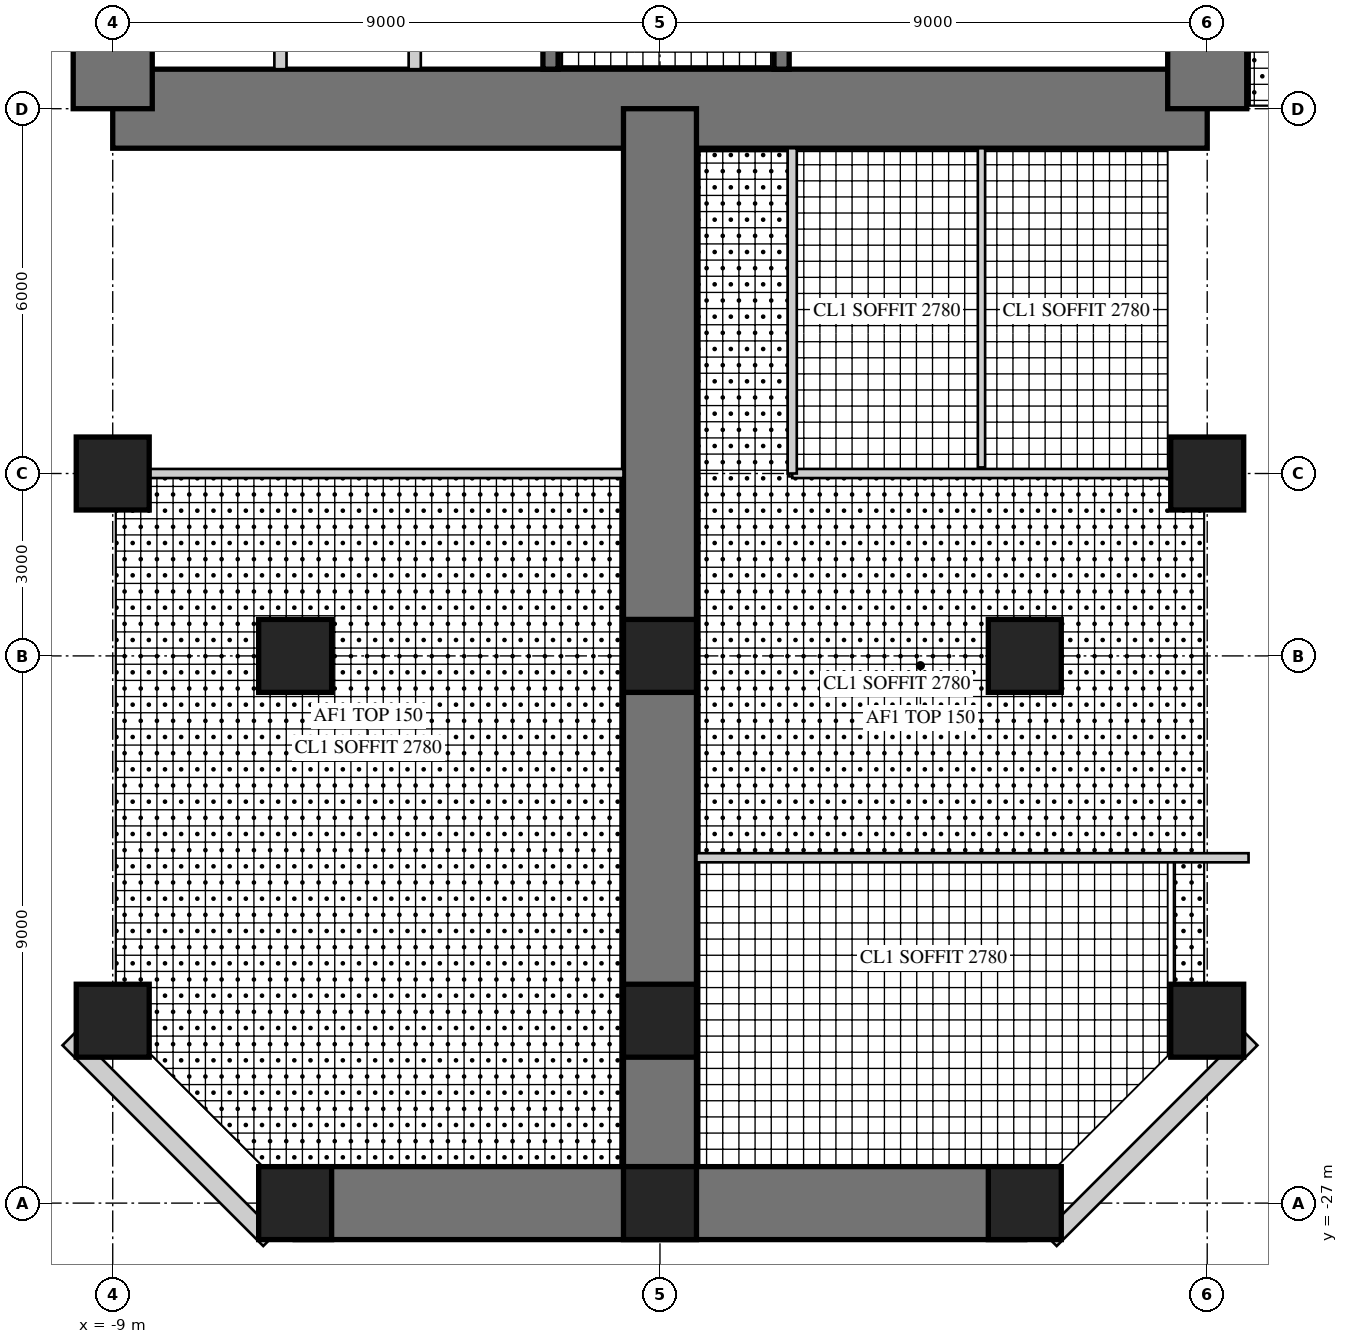
"""IFC4 building model, lengths in metres.
Left out: names, types, materials, properties, quantities, classifications, styles, units other than length and angle.
Written with IfcOpenShell. Run it as: python <this file> out.ifc"""

import sys

from ifc_helpers import new_model, si_unit, direction, frame, frame_2d, origin, origin_2d, place, context, subcontext, project, spatial, rectangle, hollow_rectangle, extrude, element, fill, save


model = new_model("IFC4")
c1 = context("Model", 3, precision=1e-05, world=origin(), true_north=direction((0.0, 1.0)))
c2 = subcontext(c1, "Body", "Model", "MODEL_VIEW")
j1 = project(units=[si_unit("LENGTHUNIT", "METRE"), si_unit("PLANEANGLEUNIT", "RADIAN")], contexts=[c1])
p1 = place(None, origin())
s1 = spatial("IfcSite", under=j1, at=p1, CompositionType="ELEMENT")
p2 = place(p1, origin())
s2 = spatial("IfcBuilding", under=s1, at=p2, CompositionType="ELEMENT")
p3 = place(p2, frame((0.0, 0.0, 71.5)))
s3 = spatial("IfcBuildingStorey", under=s2, at=p3, CompositionType="ELEMENT", Elevation=71.5)
p4 = place(p3, frame((-9.0, -9.0, 0.0), z_axis=(0.0, 0.0, 1.0), x_axis=(1.0, 0.0, 0.0)))
e1 = element("IfcWall", 1, at=p4, inside=s3, PredefinedType="SHEAR", context=c2, shape_type="SweptSolid", body=[
    extrude(rectangle(XDim=18.0, YDim=1.3, at=frame_2d((9.0, 0.0))), origin(), (0.0, 0.0, 1.0), 4.0),
])
p5 = place(p4, frame((9.8, 0.0, 0.0)))
e2 = element("IfcOpeningElement", 2, at=p5, cuts=e1, PredefinedType="OPENING", context=c2, shape_type="SweptSolid", body=[
    extrude(rectangle(XDim=1.0, YDim=2.4, at=frame_2d((0.5, 1.2))), frame((0.0, 0.66, 0.0), z_axis=(0.0, -1.0, 0.0), x_axis=(1.0, 0.0, 0.0)), (0.0, 0.0, 1.0), 1.32),
])
p6 = place(p3, frame((9.0, -9.0, 0.0), z_axis=(0.0, 0.0, 1.0), x_axis=(0.0, 1.0, 0.0)))
e3 = element("IfcWall", 3, at=p6, inside=s3, PredefinedType="SHEAR", context=c2, shape_type="SweptSolid", body=[
    extrude(rectangle(XDim=18.0, YDim=1.3, at=frame_2d((9.0, 0.0))), origin(), (0.0, 0.0, 1.0), 4.0),
])
p7 = place(p6, frame((9.8, 0.0, 0.0)))
e4 = element("IfcOpeningElement", 4, at=p7, cuts=e3, PredefinedType="OPENING", context=c2, shape_type="SweptSolid", body=[
    extrude(rectangle(XDim=1.0, YDim=2.4, at=frame_2d((0.5, 1.2))), frame((0.0, 0.66, 0.0), z_axis=(0.0, -1.0, 0.0), x_axis=(1.0, 0.0, 0.0)), (0.0, 0.0, 1.0), 1.32),
])
p8 = place(p3, frame((-9.0, 9.0, 0.0), z_axis=(0.0, 0.0, 1.0), x_axis=(0.0, -1.0, 0.0)))
e5 = element("IfcWall", 5, at=p8, inside=s3, PredefinedType="SHEAR", context=c2, shape_type="SweptSolid", body=[
    extrude(rectangle(XDim=18.0, YDim=1.3, at=frame_2d((9.0, 0.0))), origin(), (0.0, 0.0, 1.0), 4.0),
])
p9 = place(p8, frame((9.8, 0.0, 0.0)))
e6 = element("IfcOpeningElement", 6, at=p9, cuts=e5, PredefinedType="OPENING", context=c2, shape_type="SweptSolid", body=[
    extrude(rectangle(XDim=1.0, YDim=2.4, at=frame_2d((0.5, 1.2))), frame((0.0, 0.66, 0.0), z_axis=(0.0, -1.0, 0.0), x_axis=(1.0, 0.0, 0.0)), (0.0, 0.0, 1.0), 1.32),
])
p10 = place(p3, frame((-1.8, -1.875, 0.0), z_axis=(0.0, 0.0, 1.0), x_axis=(0.0, -1.0, 0.0)))
e7 = element("IfcWall", 7, at=p10, inside=s3, PredefinedType="SHEAR", context=c2, shape_type="SweptSolid", body=[
    extrude(rectangle(XDim=6.475, YDim=0.25, at=frame_2d((3.238, 0.0))), origin(), (0.0, 0.0, 1.0), 4.0),
])
p11 = place(p10, frame((1.875, 0.0, 0.0)))
e8 = element("IfcOpeningElement", 8, at=p11, cuts=e7, PredefinedType="OPENING", context=c2, shape_type="SweptSolid", body=[
    extrude(rectangle(XDim=1.6, YDim=2.4, at=frame_2d((0.8, 1.2))), frame((0.0, 0.135, 0.0), z_axis=(0.0, -1.0, 0.0), x_axis=(1.0, 0.0, 0.0)), (0.0, 0.0, 1.0), 0.27),
])
for number, where, z_axis, x_axis in (
    (9, (-4.033, -5.975, 0.0), (0.0, 0.0, 1.0), (0.0, -1.0, 0.0)),
    (10, (-6.242, -5.975, 0.0), (0.0, 0.0, 1.0), (0.0, -1.0, 0.0)),
):
    element("IfcWall", number, at=place(p3, frame(where, z_axis=z_axis, x_axis=x_axis)), inside=s3, PredefinedType="PARTITIONING", context=c2, shape_type="SweptSolid", body=[
        extrude(rectangle(XDim=2.375, YDim=0.2, at=frame_2d((1.188, 0.0))), origin(), (0.0, 0.0, 1.0), 4.0),
    ])
p12 = place(p3, frame((2.0, -1.675, 0.0), z_axis=(0.0, 0.0, 1.0), x_axis=(0.0, -1.0, 0.0)))
e11 = element("IfcWall", 11, at=p12, inside=s3, PredefinedType="SHEAR", context=c2, shape_type="SweptSolid", body=[
    extrude(rectangle(XDim=6.675, YDim=0.25, at=frame_2d((3.337, 0.0))), origin(), (0.0, 0.0, 1.0), 4.0),
])
p13 = place(p12, frame((0.725, 0.0, 0.0)))
e12 = element("IfcOpeningElement", 12, at=p13, cuts=e11, PredefinedType="OPENING", context=c2, shape_type="SweptSolid", body=[
    extrude(rectangle(XDim=1.0, YDim=2.1, at=frame_2d((0.5, 1.05))), frame((0.0, 0.135, 0.0), z_axis=(0.0, -1.0, 0.0), x_axis=(1.0, 0.0, 0.0)), (0.0, 0.0, 1.0), 0.27),
])
p14 = place(p3, frame((0.0, -9.0, 0.0), z_axis=(0.0, 0.0, 1.0), x_axis=(0.0, -1.0, 0.0)))
e13 = element("IfcWall", 13, at=p14, inside=s3, PredefinedType="SHEAR", context=c2, shape_type="SweptSolid", body=[
    extrude(rectangle(XDim=18.0, YDim=1.2, at=frame_2d((9.0, 0.0))), origin(), (0.0, 0.0, 1.0), 4.0),
])
p15 = place(p14, frame((9.9, 0.0, 0.0)))
e14 = element("IfcOpeningElement", 14, at=p15, cuts=e13, PredefinedType="OPENING", context=c2, shape_type="SweptSolid", body=[
    extrude(rectangle(XDim=1.0, YDim=2.2, at=frame_2d((0.5, 1.1))), frame((0.0, 0.61, 0.0), z_axis=(0.0, -1.0, 0.0), x_axis=(1.0, 0.0, 0.0)), (0.0, 0.0, 1.0), 1.22),
])
p16 = place(p3, frame((-6.0, -27.0, 0.0), z_axis=(0.0, 0.0, 1.0), x_axis=(1.0, 0.0, 0.0)))
e15 = element("IfcWall", 15, at=p16, inside=s3, PredefinedType="SHEAR", context=c2, shape_type="SweptSolid", body=[
    extrude(rectangle(XDim=12.0, YDim=1.2, at=frame_2d((6.0, 0.0))), origin(), (0.0, 0.0, 1.0), 4.0),
])
p17 = place(p16, frame((1.6, 0.0, 0.6)))
e16 = element("IfcOpeningElement", 16, at=p17, cuts=e15, PredefinedType="OPENING", context=c2, shape_type="SweptSolid", body=[
    extrude(rectangle(XDim=3.0, YDim=2.4, at=frame_2d((1.5, 1.2))), frame((0.0, 0.61, 0.0), z_axis=(0.0, -1.0, 0.0), x_axis=(1.0, 0.0, 0.0)), (0.0, 0.0, 1.0), 1.22),
])
p18 = place(p16, frame((7.4, 0.0, 0.6)))
e17 = element("IfcOpeningElement", 17, at=p18, cuts=e15, PredefinedType="OPENING", context=c2, shape_type="SweptSolid", body=[
    extrude(rectangle(XDim=3.0, YDim=2.4, at=frame_2d((1.5, 1.2))), frame((0.0, 0.61, 0.0), z_axis=(0.0, -1.0, 0.0), x_axis=(1.0, 0.0, 0.0)), (0.0, 0.0, 1.0), 1.22),
])
for number, where, z_axis, x_axis in (
    (18, (-9.0, -15.0, 0.0), (0.0, 0.0, 1.0), (1.0, 0.0, 0.0)),
    (19, (-9.0, -24.0, 0.0), (0.0, 0.0, 1.0), (1.0, 0.0, 0.0)),
    (20, (9.0, -15.0, 0.0), (0.0, 0.0, 1.0), (1.0, 0.0, 0.0)),
    (21, (9.0, -24.0, 0.0), (0.0, 0.0, 1.0), (1.0, 0.0, 0.0)),
    (22, (-6.0, -27.0, 0.0), (0.0, 0.0, 1.0), (1.0, 0.0, 0.0)),
    (23, (0.0, -27.0, 0.0), (0.0, 0.0, 1.0), (1.0, 0.0, 0.0)),
    (24, (6.0, -27.0, 0.0), (0.0, 0.0, 1.0), (1.0, 0.0, 0.0)),
    (25, (-6.0, -18.0, 0.0), (0.0, 0.0, 1.0), (1.0, 0.0, 0.0)),
    (26, (0.0, -18.0, 0.0), (0.0, 0.0, 1.0), (1.0, 0.0, 0.0)),
    (27, (6.0, -18.0, 0.0), (0.0, 0.0, 1.0), (1.0, 0.0, 0.0)),
    (28, (0.0, -24.0, 0.0), (0.0, 0.0, 1.0), (1.0, 0.0, 0.0)),
):
    element("IfcColumn", number, at=place(p3, frame(where, z_axis=z_axis, x_axis=x_axis)), inside=s3, PredefinedType="COLUMN", context=c2, shape_type="SweptSolid", body=[
        extrude(rectangle(XDim=1.2, YDim=1.2, at=origin_2d()), origin(), (0.0, 0.0, 1.0), 4.0),
    ])
p19 = place(p3, frame((-9.72, -24.298, 0.0), z_axis=(0.0, 0.0, 1.0), x_axis=(0.707106781187, -0.707106781187, 0.0)))
e29 = element("IfcWall", 29, at=p19, inside=s3, PredefinedType="SOLIDWALL", context=c2, shape_type="SweptSolid", body=[
    extrude(rectangle(XDim=4.669, YDim=0.3, at=frame_2d((2.335, 0.0))), origin(), (0.0, 0.0, 1.0), 3.8),
])
p20 = place(p19, frame((1.885, 0.0, 0.3)))
e30 = element("IfcOpeningElement", 30, at=p20, cuts=e29, PredefinedType="OPENING", context=c2, shape_type="SweptSolid", body=[
    extrude(rectangle(XDim=0.9, YDim=2.4, at=frame_2d((0.45, 1.2))), frame((0.0, 0.16, 0.0), z_axis=(0.0, -1.0, 0.0), x_axis=(1.0, 0.0, 0.0)), (0.0, 0.0, 1.0), 0.32),
])
p21 = place(p3, frame((6.418, -27.6, 0.0), z_axis=(0.0, 0.0, 1.0), x_axis=(0.707106781187, 0.707106781187, 0.0)))
e31 = element("IfcWall", 31, at=p21, inside=s3, PredefinedType="SOLIDWALL", context=c2, shape_type="SweptSolid", body=[
    extrude(rectangle(XDim=4.669, YDim=0.3, at=frame_2d((2.335, 0.0))), origin(), (0.0, 0.0, 1.0), 3.8),
])
p22 = place(p21, frame((1.885, 0.0, 0.3)))
e32 = element("IfcOpeningElement", 32, at=p22, cuts=e31, PredefinedType="OPENING", context=c2, shape_type="SweptSolid", body=[
    extrude(rectangle(XDim=0.9, YDim=2.4, at=frame_2d((0.45, 1.2))), frame((0.0, 0.16, 0.0), z_axis=(0.0, -1.0, 0.0), x_axis=(1.0, 0.0, 0.0)), (0.0, 0.0, 1.0), 0.32),
])
p23 = place(p3, frame((2.175, -15.0, 0.0), z_axis=(0.0, 0.0, 1.0), x_axis=(1.0, 0.0, 0.0)))
e33 = element("IfcWall", 33, at=p23, inside=s3, PredefinedType="PARTITIONING", context=c2, shape_type="SweptSolid", body=[
    extrude(rectangle(XDim=6.225, YDim=0.15, at=frame_2d((3.112, 0.0))), origin(), (0.0, 0.0, 1.0), 2.95),
])
p24 = place(p23, frame((1.056, 0.0, 0.0)))
e34 = element("IfcOpeningElement", 34, at=p24, cuts=e33, PredefinedType="OPENING", context=c2, shape_type="SweptSolid", body=[
    extrude(rectangle(XDim=1.0, YDim=2.1, at=frame_2d((0.5, 1.05))), frame((0.0, 0.085, 0.0), z_axis=(0.0, -1.0, 0.0), x_axis=(1.0, 0.0, 0.0)), (0.0, 0.0, 1.0), 0.17),
])
p25 = place(p23, frame((4.169, 0.0, 0.0)))
e35 = element("IfcOpeningElement", 35, at=p25, cuts=e33, PredefinedType="OPENING", context=c2, shape_type="SweptSolid", body=[
    extrude(rectangle(XDim=1.0, YDim=2.1, at=frame_2d((0.5, 1.05))), frame((0.0, 0.085, 0.0), z_axis=(0.0, -1.0, 0.0), x_axis=(1.0, 0.0, 0.0)), (0.0, 0.0, 1.0), 0.17),
])
p26 = place(p3, frame((2.175, -9.65, 0.0), z_axis=(0.0, 0.0, 1.0), x_axis=(0.0, -1.0, 0.0)))
e36 = element("IfcWall", 36, at=p26, inside=s3, PredefinedType="PARTITIONING", context=c2, shape_type="SweptSolid", body=[
    extrude(rectangle(XDim=5.35, YDim=0.15, at=frame_2d((2.675, 0.0))), origin(), (0.0, 0.0, 1.0), 3.8),
])
p27 = place(p3, frame((5.288, -9.65, 0.0), z_axis=(0.0, 0.0, 1.0), x_axis=(0.0, -1.0, 0.0)))
e37 = element("IfcWall", 37, at=p27, inside=s3, PredefinedType="PLUMBINGWALL", context=c2, shape_type="SweptSolid", body=[
    extrude(rectangle(XDim=5.25, YDim=0.12, at=frame_2d((2.625, 0.0))), origin(), (0.0, 0.0, 1.0), 3.8),
])
p28 = place(p3, frame((-8.4, -15.0, 0.0), z_axis=(0.0, 0.0, 1.0), x_axis=(1.0, 0.0, 0.0)))
e38 = element("IfcWall", 38, at=p28, inside=s3, PredefinedType="PARTITIONING", context=c2, shape_type="SweptSolid", body=[
    extrude(rectangle(XDim=7.8, YDim=0.15, at=frame_2d((3.9, 0.0))), origin(), (0.0, 0.0, 1.0), 2.95),
])
p29 = place(p28, frame((3.4, 0.0, 0.0)))
e39 = element("IfcOpeningElement", 39, at=p29, cuts=e38, PredefinedType="OPENING", context=c2, shape_type="SweptSolid", body=[
    extrude(rectangle(XDim=1.0, YDim=2.1, at=frame_2d((0.5, 1.05))), frame((0.0, 0.085, 0.0), z_axis=(0.0, -1.0, 0.0), x_axis=(1.0, 0.0, 0.0)), (0.0, 0.0, 1.0), 0.17),
])
p30 = place(p3, frame((0.6, -21.32, 0.0), z_axis=(0.0, 0.0, 1.0), x_axis=(1.0, 0.0, 0.0)))
e40 = element("IfcWall", 40, at=p30, inside=s3, PredefinedType="PARTITIONING", context=c2, shape_type="SweptSolid", body=[
    extrude(rectangle(XDim=9.08, YDim=0.15, at=frame_2d((4.54, 0.0))), origin(), (0.0, 0.0, 1.0), 3.8),
])
p31 = place(p30, frame((0.45, 0.0, 0.0)))
e41 = element("IfcOpeningElement", 41, at=p31, cuts=e40, PredefinedType="OPENING", context=c2, shape_type="SweptSolid", body=[
    extrude(rectangle(XDim=1.0, YDim=2.2, at=frame_2d((0.5, 1.1))), frame((0.0, 0.085, 0.0), z_axis=(0.0, -1.0, 0.0), x_axis=(1.0, 0.0, 0.0)), (0.0, 0.0, 1.0), 0.17),
])
p32 = place(p20, origin())
e42 = element("IfcWindow", 42, at=p32, inside=s3, PartitioningType="SINGLE_PANEL", PredefinedType="WINDOW", context=c2, shape_type="SweptSolid", body=[
    extrude(hollow_rectangle(XDim=0.9, YDim=2.4, WallThickness=0.06, at=frame_2d((0.45, 1.2))), frame((0.0, 0.03, 0.0), z_axis=(0.0, -1.0, 0.0), x_axis=(1.0, 0.0, 0.0)), (0.0, 0.0, 1.0), 0.06),
    extrude(rectangle(XDim=0.779, YDim=2.279, at=frame_2d((0.45, 1.2))), frame((0.0, 0.03, 0.0), z_axis=(0.0, -1.0, 0.0), x_axis=(1.0, 0.0, 0.0)), (0.0, 0.0, 1.0), 0.06),
])
fill(e30, e42)
p33 = place(p17, origin())
e43 = element("IfcWindow", 43, at=p33, inside=s3, PartitioningType="SINGLE_PANEL", PredefinedType="WINDOW", context=c2, shape_type="SweptSolid", body=[
    extrude(hollow_rectangle(XDim=3.0, YDim=2.4, WallThickness=0.06, at=frame_2d((1.5, 1.2))), frame((0.0, 0.03, 0.0), z_axis=(0.0, -1.0, 0.0), x_axis=(1.0, 0.0, 0.0)), (0.0, 0.0, 1.0), 0.06),
    extrude(rectangle(XDim=2.879, YDim=2.279, at=frame_2d((1.5, 1.2))), frame((0.0, 0.03, 0.0), z_axis=(0.0, -1.0, 0.0), x_axis=(1.0, 0.0, 0.0)), (0.0, 0.0, 1.0), 0.06),
])
fill(e16, e43)
p34 = place(p18, origin())
e44 = element("IfcWindow", 44, at=p34, inside=s3, PartitioningType="SINGLE_PANEL", PredefinedType="WINDOW", context=c2, shape_type="SweptSolid", body=[
    extrude(hollow_rectangle(XDim=3.0, YDim=2.4, WallThickness=0.06, at=frame_2d((1.5, 1.2))), frame((0.0, 0.03, 0.0), z_axis=(0.0, -1.0, 0.0), x_axis=(1.0, 0.0, 0.0)), (0.0, 0.0, 1.0), 0.06),
    extrude(rectangle(XDim=2.879, YDim=2.279, at=frame_2d((1.5, 1.2))), frame((0.0, 0.03, 0.0), z_axis=(0.0, -1.0, 0.0), x_axis=(1.0, 0.0, 0.0)), (0.0, 0.0, 1.0), 0.06),
])
fill(e17, e44)
p35 = place(p22, origin())
e45 = element("IfcWindow", 45, at=p35, inside=s3, PartitioningType="SINGLE_PANEL", PredefinedType="WINDOW", context=c2, shape_type="SweptSolid", body=[
    extrude(hollow_rectangle(XDim=0.9, YDim=2.4, WallThickness=0.06, at=frame_2d((0.45, 1.2))), frame((0.0, 0.03, 0.0), z_axis=(0.0, -1.0, 0.0), x_axis=(1.0, 0.0, 0.0)), (0.0, 0.0, 1.0), 0.06),
    extrude(rectangle(XDim=0.779, YDim=2.279, at=frame_2d((0.45, 1.2))), frame((0.0, 0.03, 0.0), z_axis=(0.0, -1.0, 0.0), x_axis=(1.0, 0.0, 0.0)), (0.0, 0.0, 1.0), 0.06),
])
fill(e32, e45)
p36 = place(p24, origin())
e46 = element("IfcDoor", 46, at=p36, inside=s3, OperationType="SINGLE_SWING_LEFT", PredefinedType="DOOR", context=c2, shape_type="SweptSolid", body=[
    extrude(rectangle(XDim=1.0, YDim=2.1, at=frame_2d((0.5, 1.05))), frame((0.0, 0.025, 0.0), z_axis=(0.0, -1.0, 0.0), x_axis=(1.0, 0.0, 0.0)), (0.0, 0.0, 1.0), 0.05),
])
fill(e34, e46)
p37 = place(p25, origin())
e47 = element("IfcDoor", 47, at=p37, inside=s3, OperationType="SINGLE_SWING_LEFT", PredefinedType="DOOR", context=c2, shape_type="SweptSolid", body=[
    extrude(rectangle(XDim=1.0, YDim=2.1, at=frame_2d((0.5, 1.05))), frame((0.0, 0.025, 0.0), z_axis=(0.0, -1.0, 0.0), x_axis=(1.0, 0.0, 0.0)), (0.0, 0.0, 1.0), 0.05),
])
fill(e35, e47)
p38 = place(p29, origin())
e48 = element("IfcDoor", 48, at=p38, inside=s3, OperationType="SINGLE_SWING_RIGHT", PredefinedType="DOOR", context=c2, shape_type="SweptSolid", body=[
    extrude(rectangle(XDim=1.0, YDim=2.1, at=frame_2d((0.5, 1.05))), frame((0.0, 0.025, 0.0), z_axis=(0.0, -1.0, 0.0), x_axis=(1.0, 0.0, 0.0)), (0.0, 0.0, 1.0), 0.05),
])
fill(e39, e48)
p39 = place(p31, frame((1.0, 0.0, 0.0), z_axis=(0.0, 0.0, 1.0), x_axis=(-1.0, 0.0, 0.0)))
e49 = element("IfcDoor", 49, at=p39, inside=s3, OperationType="SINGLE_SWING_RIGHT", PredefinedType="DOOR", context=c2, shape_type="SweptSolid", body=[
    extrude(rectangle(XDim=1.0, YDim=2.2, at=frame_2d((0.5, 1.1))), frame((0.0, 0.025, 0.0), z_axis=(0.0, -1.0, 0.0), x_axis=(1.0, 0.0, 0.0)), (0.0, 0.0, 1.0), 0.05),
])
fill(e41, e49)
p40 = place(p15, origin())
e50 = element("IfcDoor", 50, at=p40, inside=s3, OperationType="SINGLE_SWING_RIGHT", PredefinedType="DOOR", context=c2, shape_type="SweptSolid", body=[
    extrude(rectangle(XDim=1.0, YDim=2.2, at=frame_2d((0.5, 1.1))), frame((0.0, 0.025, 0.0), z_axis=(0.0, -1.0, 0.0), x_axis=(1.0, 0.0, 0.0)), (0.0, 0.0, 1.0), 0.05),
])
fill(e14, e50)
p41 = place(p5, frame((1.0, 0.0, 0.0), z_axis=(0.0, 0.0, 1.0), x_axis=(-1.0, 0.0, 0.0)))
e51 = element("IfcDoor", 51, at=p41, inside=s3, OperationType="SINGLE_SWING_RIGHT", PredefinedType="DOOR", context=c2, shape_type="SweptSolid", body=[
    extrude(rectangle(XDim=1.0, YDim=2.4, at=frame_2d((0.5, 1.2))), frame((0.0, -0.005, 0.0), z_axis=(0.0, -1.0, 0.0), x_axis=(1.0, 0.0, 0.0)), (0.0, 0.0, 1.0), 0.05),
])
fill(e2, e51)
save(model, sys.argv[1])
